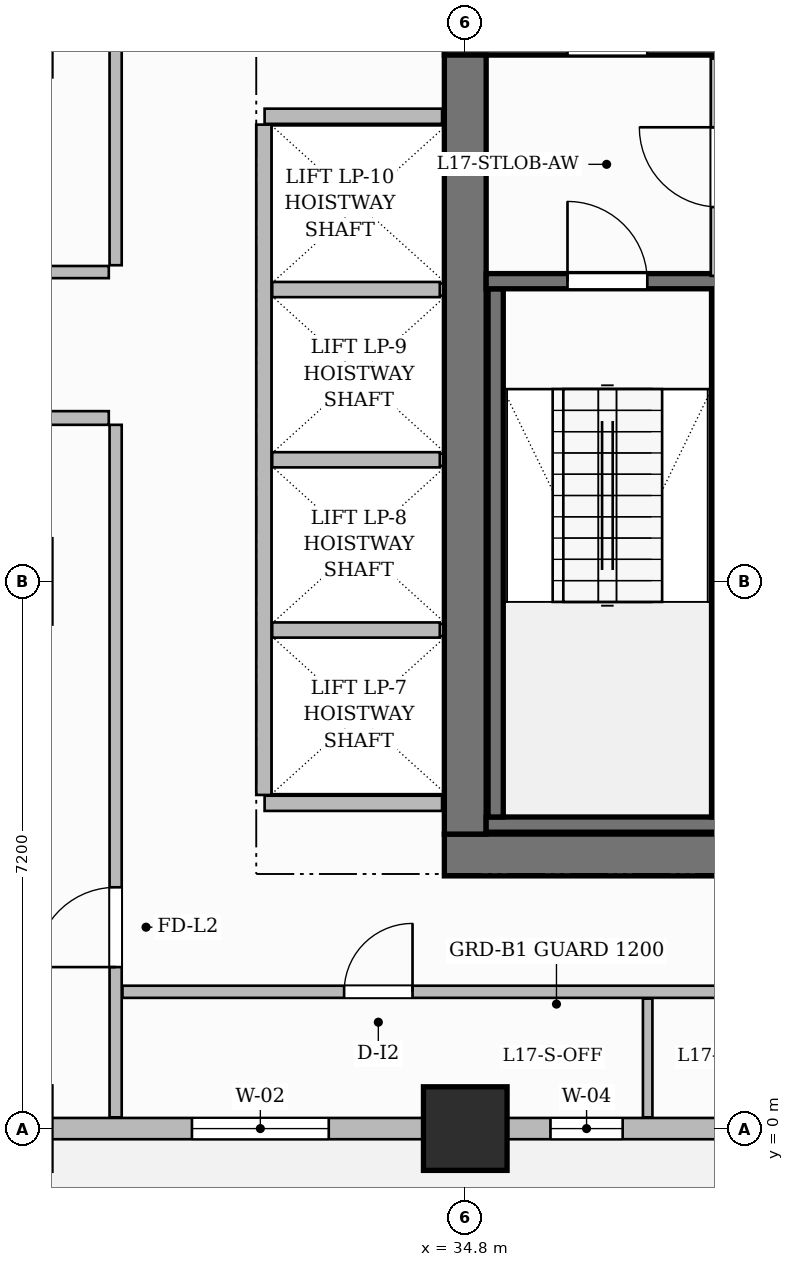
"""IFC4 building model, lengths in metres.
Left out: names, types, materials, properties, quantities, classifications, styles, units other than length and angle.
Written with IfcOpenShell. Run it as: python <this file> out.ifc"""

import sys

from ifc_helpers import new_model, si_unit, direction, frame, frame_2d, origin, origin_2d, place, context, subcontext, project, spatial, rectangle, extrude, source, transform, mapped, element, fill, save


model = new_model("IFC4")
c1 = context("Model", 3, precision=1e-05, world=origin(), true_north=direction((0.0, 1.0)))
c2 = subcontext(c1, "Body", "Model", "MODEL_VIEW")
j1 = project(units=[si_unit("LENGTHUNIT", "METRE"), si_unit("PLANEANGLEUNIT", "RADIAN")], contexts=[c1])
p1 = place(None, origin())
s1 = spatial("IfcSite", under=j1, at=p1, CompositionType="ELEMENT")
p2 = place(p1, origin())
s2 = spatial("IfcBuilding", under=s1, at=p2, CompositionType="ELEMENT")
p3 = place(p2, frame((0.0, 0.0, 73.1)))
s3 = spatial("IfcBuildingStorey", under=s2, at=p3, CompositionType="ELEMENT", Elevation=73.1)
p4 = place(p3, frame((34.525, 3.6, 0.0), z_axis=(0.0, 0.0, 1.0), x_axis=(1.0, 0.0, 0.0)))
e1 = element("IfcWall", 1, at=p4, inside=s3, PredefinedType="SHEAR", context=c2, shape_type="SweptSolid", body=[
    extrude(rectangle(XDim=15.55, YDim=0.55, at=frame_2d((7.775, 0.0))), origin(), (0.0, 0.0, 1.0), 3.7),
])
p5 = place(p4, frame((4.825, 0.0, 0.0)))
e2 = element("IfcOpeningElement", 2, at=p5, cuts=e1, PredefinedType="OPENING", context=c2, shape_type="SweptSolid", body=[
    extrude(rectangle(XDim=0.9, YDim=2.1, at=frame_2d((0.45, 1.05))), frame((0.0, 0.285, 0.0), z_axis=(0.0, -1.0, 0.0), x_axis=(1.0, 0.0, 0.0)), (0.0, 0.0, 1.0), 0.57),
])
p6 = place(p4, frame((7.245, 0.0, 0.0)))
e3 = element("IfcOpeningElement", 3, at=p6, cuts=e1, PredefinedType="OPENING", context=c2, shape_type="SweptSolid", body=[
    extrude(rectangle(XDim=0.9, YDim=2.1, at=frame_2d((0.45, 1.05))), frame((0.0, 0.285, 0.0), z_axis=(0.0, -1.0, 0.0), x_axis=(1.0, 0.0, 0.0)), (0.0, 0.0, 1.0), 0.57),
])
p7 = place(p3, frame((34.525, 14.4, 0.0), z_axis=(0.0, 0.0, 1.0), x_axis=(1.0, 0.0, 0.0)))
e4 = element("IfcWall", 4, at=p7, inside=s3, PredefinedType="SHEAR", context=c2, shape_type="SweptSolid", body=[
    extrude(rectangle(XDim=15.55, YDim=0.55, at=frame_2d((7.775, 0.0))), origin(), (0.0, 0.0, 1.0), 3.7),
])
p8 = place(p7, frame((5.405, 0.0, 0.0)))
e5 = element("IfcOpeningElement", 5, at=p8, cuts=e4, PredefinedType="OPENING", context=c2, shape_type="SweptSolid", body=[
    extrude(rectangle(XDim=1.5, YDim=2.2, at=frame_2d((0.75, 1.1))), frame((0.0, 0.285, 0.0), z_axis=(0.0, -1.0, 0.0), x_axis=(1.0, 0.0, 0.0)), (0.0, 0.0, 1.0), 0.57),
])
p9 = place(p7, frame((1.62, 0.0, 0.0)))
e6 = element("IfcOpeningElement", 6, at=p9, cuts=e4, PredefinedType="OPENING", context=c2, shape_type="SweptSolid", body=[
    extrude(rectangle(XDim=1.05, YDim=2.15, at=frame_2d((0.525, 1.075))), frame((0.0, 0.285, 0.0), z_axis=(0.0, -1.0, 0.0), x_axis=(1.0, 0.0, 0.0)), (0.0, 0.0, 1.0), 0.57),
])
p10 = place(p7, frame((11.25, 0.0, 0.0)))
e7 = element("IfcOpeningElement", 7, at=p10, cuts=e4, PredefinedType="OPENING", context=c2, shape_type="SweptSolid", body=[
    extrude(rectangle(XDim=1.05, YDim=2.15, at=frame_2d((0.525, 1.075))), frame((0.0, 0.285, 0.0), z_axis=(0.0, -1.0, 0.0), x_axis=(1.0, 0.0, 0.0)), (0.0, 0.0, 1.0), 0.57),
])
p11 = place(p3, frame((34.8, 3.875, 0.0), z_axis=(0.0, 0.0, 1.0), x_axis=(0.0, 1.0, 0.0)))
e8 = element("IfcWall", 8, at=p11, inside=s3, PredefinedType="SHEAR", context=c2, shape_type="SweptSolid", body=[
    extrude(rectangle(XDim=10.25, YDim=0.55, at=frame_2d((5.125, 0.0))), origin(), (0.0, 0.0, 1.0), 3.7),
])
m1 = source(origin(), c2, "Body", "SweptSolid", [
    extrude(rectangle(XDim=1.1, YDim=1.1, at=origin_2d()), origin(), (0.0, 0.0, 1.0), 3.7),
])
p12 = place(p3, frame((34.8, 0.0, 0.0), z_axis=(0.0, 0.0, 1.0), x_axis=(1.0, 0.0, 0.0)))
e9 = element("IfcColumn", 9, at=p12, inside=s3, PredefinedType="COLUMN", context=c2, shape_type="MappedRepresentation", body=[
    mapped(m1, transform((0.0, 0.0, 0.0), scale=1.0)),
])
p13 = place(p3, frame((35.075, 4.0, 0.0), z_axis=(0.0, 0.0, 1.0), x_axis=(1.0, 0.0, 0.0)))
e10 = element("IfcWall", 10, at=p13, inside=s3, PredefinedType="SHEAR", context=c2, shape_type="SweptSolid", body=[
    extrude(rectangle(XDim=3.165, YDim=0.2, at=frame_2d((1.583, 0.0))), origin(), (0.0, 0.0, 1.0), 3.7),
])
for number, where, z_axis, x_axis in (
    (11, (35.2, 4.1, 0.0), (0.0, 0.0, 1.0), (0.0, 1.0, 0.0)),
    (12, (38.14, 4.1, 0.0), (0.0, 0.0, 1.0), (0.0, 1.0, 0.0)),
):
    element("IfcWall", number, at=place(p3, frame(where, z_axis=z_axis, x_axis=x_axis)), inside=s3, PredefinedType="SHEAR", context=c2, shape_type="SweptSolid", body=[
        extrude(rectangle(XDim=6.95, YDim=0.2, at=frame_2d((3.475, 0.0))), origin(), (0.0, 0.0, 1.0), 3.7),
    ])
p14 = place(p3, frame((35.075, 11.15, 0.0), z_axis=(0.0, 0.0, 1.0), x_axis=(1.0, 0.0, 0.0)))
e13 = element("IfcWall", 13, at=p14, inside=s3, PredefinedType="SHEAR", context=c2, shape_type="SweptSolid", body=[
    extrude(rectangle(XDim=3.165, YDim=0.2, at=frame_2d((1.583, 0.0))), origin(), (0.0, 0.0, 1.0), 3.7),
])
p15 = place(p14, frame((1.07, 0.0, 0.0)))
e14 = element("IfcOpeningElement", 14, at=p15, cuts=e13, PredefinedType="OPENING", context=c2, shape_type="SweptSolid", body=[
    extrude(rectangle(XDim=1.05, YDim=2.2, at=frame_2d((0.525, 1.1))), frame((0.0, 0.11, 0.0), z_axis=(0.0, -1.0, 0.0), x_axis=(1.0, 0.0, 0.0)), (0.0, 0.0, 1.0), 0.22),
])
p16 = place(p3, frame((38.14, 11.22, 0.0), z_axis=(0.0, 0.0, 1.0), x_axis=(0.0, 1.0, 0.0)))
e15 = element("IfcWall", 15, at=p16, inside=s3, PredefinedType="PARTITIONING", context=c2, shape_type="SweptSolid", body=[
    extrude(rectangle(XDim=2.86, YDim=0.22, at=frame_2d((1.43, 0.0))), origin(), (0.0, 0.0, 1.0), 3.45),
])
p17 = place(p16, frame((0.905, 0.0, 0.0)))
e16 = element("IfcOpeningElement", 16, at=p17, cuts=e15, PredefinedType="OPENING", context=c2, shape_type="SweptSolid", body=[
    extrude(rectangle(XDim=1.05, YDim=2.15, at=frame_2d((0.525, 1.075))), frame((0.0, 0.12, 0.0), z_axis=(0.0, -1.0, 0.0), x_axis=(1.0, 0.0, 0.0)), (0.0, 0.0, 1.0), 0.24),
])
for number, where, z_axis, x_axis in (
    (17, (32.16, 4.28, 0.0), (0.0, 0.0, 1.0), (1.0, 0.0, 0.0)),
    (18, (32.16, 13.32, 0.0), (0.0, 0.0, 1.0), (1.0, 0.0, 0.0)),
):
    element("IfcWall", number, at=place(p3, frame(where, z_axis=z_axis, x_axis=x_axis)), inside=s3, PredefinedType="PARTITIONING", context=c2, shape_type="SweptSolid", body=[
        extrude(rectangle(XDim=2.335, YDim=0.2, at=frame_2d((1.167, 0.0))), origin(), (0.0, 0.0, 1.0), 3.45),
    ])
p18 = place(p3, frame((32.15, 4.39, 0.0), z_axis=(0.0, 0.0, 1.0), x_axis=(0.0, 1.0, 0.0)))
e19 = element("IfcWall", 19, at=p18, inside=s3, PredefinedType="PARTITIONING", context=c2, shape_type="SweptSolid", body=[
    extrude(rectangle(XDim=8.82, YDim=0.2, at=frame_2d((4.41, 0.0))), origin(), (0.0, 0.0, 1.0), 3.45),
])
for number, where, z_axis, x_axis in (
    (20, (32.26, 6.56, 0.0), (0.0, 0.0, 1.0), (1.0, 0.0, 0.0)),
    (21, (32.26, 8.8, 0.0), (0.0, 0.0, 1.0), (1.0, 0.0, 0.0)),
    (22, (32.26, 11.04, 0.0), (0.0, 0.0, 1.0), (1.0, 0.0, 0.0)),
):
    element("IfcWall", number, at=place(p3, frame(where, z_axis=z_axis, x_axis=x_axis)), inside=s3, PredefinedType="PARTITIONING", context=c2, shape_type="SweptSolid", body=[
        extrude(rectangle(XDim=2.205, YDim=0.2, at=frame_2d((1.103, 0.0))), origin(), (0.0, 0.0, 1.0), 3.45),
    ])
p19 = place(p3, frame((14.548, 9.35, 0.0), z_axis=(0.0, 0.0, 1.0), x_axis=(1.0, 0.0, 0.0)))
e23 = element("IfcWall", 23, at=p19, inside=s3, PredefinedType="PARTITIONING", context=c2, shape_type="SweptSolid", body=[
    extrude(rectangle(XDim=15.562, YDim=0.18, at=frame_2d((7.781, 0.0))), origin(), (0.0, 0.0, 1.0), 3.45),
])
p20 = place(p19, frame((2.908, 0.0, 0.0)))
e24 = element("IfcOpeningElement", 24, at=p20, cuts=e23, PredefinedType="OPENING", context=c2, shape_type="SweptSolid", body=[
    extrude(rectangle(XDim=1.0, YDim=2.2, at=frame_2d((0.5, 1.1))), frame((0.0, 0.1, 0.0), z_axis=(0.0, -1.0, 0.0), x_axis=(1.0, 0.0, 0.0)), (0.0, 0.0, 1.0), 0.2),
])
p21 = place(p19, frame((5.985, 0.0, 0.0)))
e25 = element("IfcOpeningElement", 25, at=p21, cuts=e23, PredefinedType="OPENING", context=c2, shape_type="SweptSolid", body=[
    extrude(rectangle(XDim=1.05, YDim=2.25, at=frame_2d((0.525, 1.125))), frame((0.0, 0.1, 0.0), z_axis=(0.0, -1.0, 0.0), x_axis=(1.0, 0.0, 0.0)), (0.0, 0.0, 1.0), 0.2),
])
p22 = place(p19, frame((13.72, 0.0, 0.0)))
e26 = element("IfcOpeningElement", 26, at=p22, cuts=e23, PredefinedType="OPENING", context=c2, shape_type="SweptSolid", body=[
    extrude(rectangle(XDim=1.0, YDim=2.2, at=frame_2d((0.5, 1.1))), frame((0.0, 0.1, 0.0), z_axis=(0.0, -1.0, 0.0), x_axis=(1.0, 0.0, 0.0)), (0.0, 0.0, 1.0), 0.2),
])
p23 = place(p3, frame((14.548, 11.27, 0.0), z_axis=(0.0, 0.0, 1.0), x_axis=(1.0, 0.0, 0.0)))
e27 = element("IfcWall", 27, at=p23, inside=s3, PredefinedType="PARTITIONING", context=c2, shape_type="SweptSolid", body=[
    extrude(rectangle(XDim=15.562, YDim=0.16, at=frame_2d((7.781, 0.0))), origin(), (0.0, 0.0, 1.0), 3.45),
])
p24 = place(p23, frame((8.377, 0.0, 0.0)))
e28 = element("IfcOpeningElement", 28, at=p24, cuts=e27, PredefinedType="OPENING", context=c2, shape_type="SweptSolid", body=[
    extrude(rectangle(XDim=1.6, YDim=2.4, at=frame_2d((0.8, 1.2))), frame((0.0, 0.09, 0.0), z_axis=(0.0, -1.0, 0.0), x_axis=(1.0, 0.0, 0.0)), (0.0, 0.0, 1.0), 0.18),
])
p25 = place(p3, frame((30.2, 11.36, 0.0), z_axis=(0.0, 0.0, 1.0), x_axis=(0.0, 1.0, 0.0)))
e29 = element("IfcWall", 29, at=p25, inside=s3, PredefinedType="PARTITIONING", context=c2, shape_type="SweptSolid", body=[
    extrude(rectangle(XDim=6.1, YDim=0.16, at=frame_2d((3.05, 0.0))), origin(), (0.0, 0.0, 1.0), 3.45),
])
p26 = place(p3, frame((30.2, 0.148, 0.0), z_axis=(0.0, 0.0, 1.0), x_axis=(0.0, 1.0, 0.0)))
e30 = element("IfcWall", 30, at=p26, inside=s3, PredefinedType="PARTITIONING", context=c2, shape_type="SweptSolid", body=[
    extrude(rectangle(XDim=9.112, YDim=0.16, at=frame_2d((4.556, 0.0))), origin(), (0.0, 0.0, 1.0), 3.45),
])
p27 = place(p26, frame((1.977, 0.0, 0.0)))
e31 = element("IfcOpeningElement", 31, at=p27, cuts=e30, PredefinedType="OPENING", context=c2, shape_type="SweptSolid", body=[
    extrude(rectangle(XDim=1.05, YDim=2.15, at=frame_2d((0.525, 1.075))), frame((0.0, 0.09, 0.0), z_axis=(0.0, -1.0, 0.0), x_axis=(1.0, 0.0, 0.0)), (0.0, 0.0, 1.0), 0.18),
])
p28 = place(p3, frame((30.29, 1.8, 0.0), z_axis=(0.0, 0.0, 1.0), x_axis=(1.0, 0.0, 0.0)))
e32 = element("IfcWall", 32, at=p28, inside=s3, PredefinedType="PARTITIONING", context=c2, shape_type="SweptSolid", body=[
    extrude(rectangle(XDim=19.37, YDim=0.16, at=frame_2d((9.685, 0.0))), origin(), (0.0, 0.0, 1.0), 3.45),
])
p29 = place(p28, frame((2.916, 0.0, 0.0)))
e33 = element("IfcOpeningElement", 33, at=p29, cuts=e32, PredefinedType="OPENING", context=c2, shape_type="SweptSolid", body=[
    extrude(rectangle(XDim=0.9, YDim=2.15, at=frame_2d((0.45, 1.075))), frame((0.0, 0.09, 0.0), z_axis=(0.0, -1.0, 0.0), x_axis=(1.0, 0.0, 0.0)), (0.0, 0.0, 1.0), 0.18),
])
p30 = place(p28, frame((9.66, 0.0, 0.0)))
e34 = element("IfcOpeningElement", 34, at=p30, cuts=e32, PredefinedType="OPENING", context=c2, shape_type="SweptSolid", body=[
    extrude(rectangle(XDim=0.9, YDim=2.15, at=frame_2d((0.45, 1.075))), frame((0.0, 0.09, 0.0), z_axis=(0.0, -1.0, 0.0), x_axis=(1.0, 0.0, 0.0)), (0.0, 0.0, 1.0), 0.18),
])
p31 = place(p28, frame((15.86, 0.0, 0.0)))
e35 = element("IfcOpeningElement", 35, at=p31, cuts=e32, PredefinedType="OPENING", context=c2, shape_type="SweptSolid", body=[
    extrude(rectangle(XDim=0.9, YDim=2.15, at=frame_2d((0.45, 1.075))), frame((0.0, 0.09, 0.0), z_axis=(0.0, -1.0, 0.0), x_axis=(1.0, 0.0, 0.0)), (0.0, 0.0, 1.0), 0.18),
])
p32 = place(p3, frame((37.2, 0.148, 0.0), z_axis=(0.0, 0.0, 1.0), x_axis=(0.0, 1.0, 0.0)))
e36 = element("IfcWall", 36, at=p32, inside=s3, PredefinedType="PARTITIONING", context=c2, shape_type="SweptSolid", body=[
    extrude(rectangle(XDim=1.562, YDim=0.125, at=frame_2d((0.781, 0.0))), origin(), (0.0, 0.0, 1.0), 3.45),
])
p33 = place(p3, frame((14.4, 0.0, 0.0), z_axis=(0.0, 0.0, 1.0), x_axis=(1.0, 0.0, 0.0)))
e37 = element("IfcWall", 37, at=p33, inside=s3, PredefinedType="SOLIDWALL", context=c2, shape_type="SweptSolid", body=[
    extrude(rectangle(XDim=43.2, YDim=0.28, at=frame_2d((21.6, 0.0))), origin(), (0.0, 0.0, 1.0), 2.885),
])
p34 = place(p33, frame((0.85, 0.0, 0.0)))
e38 = element("IfcOpeningElement", 38, at=p34, cuts=e37, PredefinedType="OPENING", context=c2, shape_type="SweptSolid", body=[
    extrude(rectangle(XDim=1.2, YDim=2.2, at=frame_2d((0.6, 1.1))), frame((0.0, 0.15, 0.0), z_axis=(0.0, -1.0, 0.0), x_axis=(1.0, 0.0, 0.0)), (0.0, 0.0, 1.0), 0.3),
])
p35 = place(p33, frame((2.811, 0.0, 0.8)))
e39 = element("IfcOpeningElement", 39, at=p35, cuts=e37, PredefinedType="OPENING", context=c2, shape_type="SweptSolid", body=[
    extrude(rectangle(XDim=1.8, YDim=1.85, at=frame_2d((0.9, 0.925))), frame((0.0, 0.15, 0.0), z_axis=(0.0, -1.0, 0.0), x_axis=(1.0, 0.0, 0.0)), (0.0, 0.0, 1.0), 0.3),
])
p36 = place(p33, frame((5.269, 0.0, 0.8)))
e40 = element("IfcOpeningElement", 40, at=p36, cuts=e37, PredefinedType="OPENING", context=c2, shape_type="SweptSolid", body=[
    extrude(rectangle(XDim=0.95, YDim=1.75, at=frame_2d((0.475, 0.875))), frame((0.0, 0.15, 0.0), z_axis=(0.0, -1.0, 0.0), x_axis=(1.0, 0.0, 0.0)), (0.0, 0.0, 1.0), 0.3),
])
p37 = place(p33, frame((8.389, 0.0, 0.8)))
e41 = element("IfcOpeningElement", 41, at=p37, cuts=e37, PredefinedType="OPENING", context=c2, shape_type="SweptSolid", body=[
    extrude(rectangle(XDim=1.8, YDim=1.85, at=frame_2d((0.9, 0.925))), frame((0.0, 0.15, 0.0), z_axis=(0.0, -1.0, 0.0), x_axis=(1.0, 0.0, 0.0)), (0.0, 0.0, 1.0), 0.3),
])
p38 = place(p33, frame((11.197, 0.0, 0.8)))
e42 = element("IfcOpeningElement", 42, at=p38, cuts=e37, PredefinedType="OPENING", context=c2, shape_type="SweptSolid", body=[
    extrude(rectangle(XDim=1.8, YDim=1.85, at=frame_2d((0.9, 0.925))), frame((0.0, 0.15, 0.0), z_axis=(0.0, -1.0, 0.0), x_axis=(1.0, 0.0, 0.0)), (0.0, 0.0, 1.0), 0.3),
])
p39 = place(p33, frame((16.804, 0.0, 0.8)))
e43 = element("IfcOpeningElement", 43, at=p39, cuts=e37, PredefinedType="OPENING", context=c2, shape_type="SweptSolid", body=[
    extrude(rectangle(XDim=1.8, YDim=1.85, at=frame_2d((0.9, 0.925))), frame((0.0, 0.15, 0.0), z_axis=(0.0, -1.0, 0.0), x_axis=(1.0, 0.0, 0.0)), (0.0, 0.0, 1.0), 0.3),
])
p40 = place(p33, frame((21.521, 0.0, 0.8)))
e44 = element("IfcOpeningElement", 44, at=p40, cuts=e37, PredefinedType="OPENING", context=c2, shape_type="SweptSolid", body=[
    extrude(rectangle(XDim=0.95, YDim=1.75, at=frame_2d((0.475, 0.875))), frame((0.0, 0.15, 0.0), z_axis=(0.0, -1.0, 0.0), x_axis=(1.0, 0.0, 0.0)), (0.0, 0.0, 1.0), 0.3),
])
p41 = place(p33, frame((23.904, 0.0, 0.8)))
e45 = element("IfcOpeningElement", 45, at=p41, cuts=e37, PredefinedType="OPENING", context=c2, shape_type="SweptSolid", body=[
    extrude(rectangle(XDim=1.8, YDim=1.85, at=frame_2d((0.9, 0.925))), frame((0.0, 0.15, 0.0), z_axis=(0.0, -1.0, 0.0), x_axis=(1.0, 0.0, 0.0)), (0.0, 0.0, 1.0), 0.3),
])
p42 = place(p33, frame((29.681, 0.0, 0.8)))
e46 = element("IfcOpeningElement", 46, at=p42, cuts=e37, PredefinedType="OPENING", context=c2, shape_type="SweptSolid", body=[
    extrude(rectangle(XDim=1.8, YDim=1.85, at=frame_2d((0.9, 0.925))), frame((0.0, 0.15, 0.0), z_axis=(0.0, -1.0, 0.0), x_axis=(1.0, 0.0, 0.0)), (0.0, 0.0, 1.0), 0.3),
])
p43 = place(p33, frame((32.327, 0.0, 0.8)))
e47 = element("IfcOpeningElement", 47, at=p43, cuts=e37, PredefinedType="OPENING", context=c2, shape_type="SweptSolid", body=[
    extrude(rectangle(XDim=1.8, YDim=1.85, at=frame_2d((0.9, 0.925))), frame((0.0, 0.15, 0.0), z_axis=(0.0, -1.0, 0.0), x_axis=(1.0, 0.0, 0.0)), (0.0, 0.0, 1.0), 0.3),
])
p44 = place(p33, frame((36.875, 0.0, 0.8)))
e48 = element("IfcOpeningElement", 48, at=p44, cuts=e37, PredefinedType="OPENING", context=c2, shape_type="SweptSolid", body=[
    extrude(rectangle(XDim=1.8, YDim=1.85, at=frame_2d((0.9, 0.925))), frame((0.0, 0.15, 0.0), z_axis=(0.0, -1.0, 0.0), x_axis=(1.0, 0.0, 0.0)), (0.0, 0.0, 1.0), 0.3),
])
p45 = place(p33, frame((39.925, 0.0, 0.8)))
e49 = element("IfcOpeningElement", 49, at=p45, cuts=e37, PredefinedType="OPENING", context=c2, shape_type="SweptSolid", body=[
    extrude(rectangle(XDim=1.8, YDim=1.85, at=frame_2d((0.9, 0.925))), frame((0.0, 0.15, 0.0), z_axis=(0.0, -1.0, 0.0), x_axis=(1.0, 0.0, 0.0)), (0.0, 0.0, 1.0), 0.3),
])
m2 = source(origin(), c2, "Body", "SweptSolid", [
    extrude(rectangle(XDim=1.05, YDim=2.2, at=frame_2d((0.525, 1.1))), frame((0.0, 0.025, 0.0), z_axis=(0.0, -1.0, 0.0), x_axis=(1.0, 0.0, 0.0)), (0.0, 0.0, 1.0), 0.05),
])
p46 = place(p15, origin())
e50 = element("IfcDoor", 50, at=p46, inside=s3, OperationType="SINGLE_SWING_LEFT", PredefinedType="DOOR", context=c2, shape_type="MappedRepresentation", body=[
    mapped(m2, transform((0.0, 0.0, 0.0), scale=1.0)),
])
fill(e14, e50)
m3 = source(origin(), c2, "Body", "SweptSolid", [
    extrude(rectangle(XDim=1.05, YDim=2.15, at=frame_2d((0.525, 1.075))), frame((0.0, 0.025, 0.0), z_axis=(0.0, -1.0, 0.0), x_axis=(1.0, 0.0, 0.0)), (0.0, 0.0, 1.0), 0.05),
])
p47 = place(p27, origin())
e51 = element("IfcDoor", 51, at=p47, inside=s3, OperationType="SINGLE_SWING_LEFT", PredefinedType="DOOR", context=c2, shape_type="MappedRepresentation", body=[
    mapped(m3, transform((0.0, 0.0, 0.0), scale=1.0)),
])
fill(e31, e51)
m4 = source(origin(), c2, "Body", "SweptSolid", [
    extrude(rectangle(XDim=0.9, YDim=2.15, at=frame_2d((0.45, 1.075))), frame((0.0, 0.025, 0.0), z_axis=(0.0, -1.0, 0.0), x_axis=(1.0, 0.0, 0.0)), (0.0, 0.0, 1.0), 0.05),
])
p48 = place(p29, origin())
e52 = element("IfcDoor", 52, at=p48, inside=s3, OperationType="SINGLE_SWING_RIGHT", PredefinedType="DOOR", context=c2, shape_type="MappedRepresentation", body=[
    mapped(m4, transform((0.0, 0.0, 0.0), scale=1.0)),
])
fill(e33, e52)
m5 = source(origin(), c2, "Body", "SweptSolid", [
    extrude(rectangle(XDim=1.8, YDim=1.85, at=frame_2d((0.9, 0.925))), frame((0.0, 0.03, 0.0), z_axis=(0.0, -1.0, 0.0), x_axis=(1.0, 0.0, 0.0)), (0.0, 0.0, 1.0), 0.06),
])
p49 = place(p39, origin())
e53 = element("IfcWindow", 53, at=p49, inside=s3, PartitioningType="DOUBLE_PANEL_VERTICAL", PredefinedType="WINDOW", context=c2, shape_type="MappedRepresentation", body=[
    mapped(m5, transform((0.0, 0.0, 0.0), scale=1.0)),
])
fill(e43, e53)
m6 = source(origin(), c2, "Body", "SweptSolid", [
    extrude(rectangle(XDim=0.95, YDim=1.75, at=frame_2d((0.475, 0.875))), frame((0.0, 0.03, 0.0), z_axis=(0.0, -1.0, 0.0), x_axis=(1.0, 0.0, 0.0)), (0.0, 0.0, 1.0), 0.06),
])
p50 = place(p40, origin())
e54 = element("IfcWindow", 54, at=p50, inside=s3, PartitioningType="SINGLE_PANEL", PredefinedType="WINDOW", context=c2, shape_type="MappedRepresentation", body=[
    mapped(m6, transform((0.0, 0.0, 0.0), scale=1.0)),
])
fill(e44, e54)
save(model, sys.argv[1])
